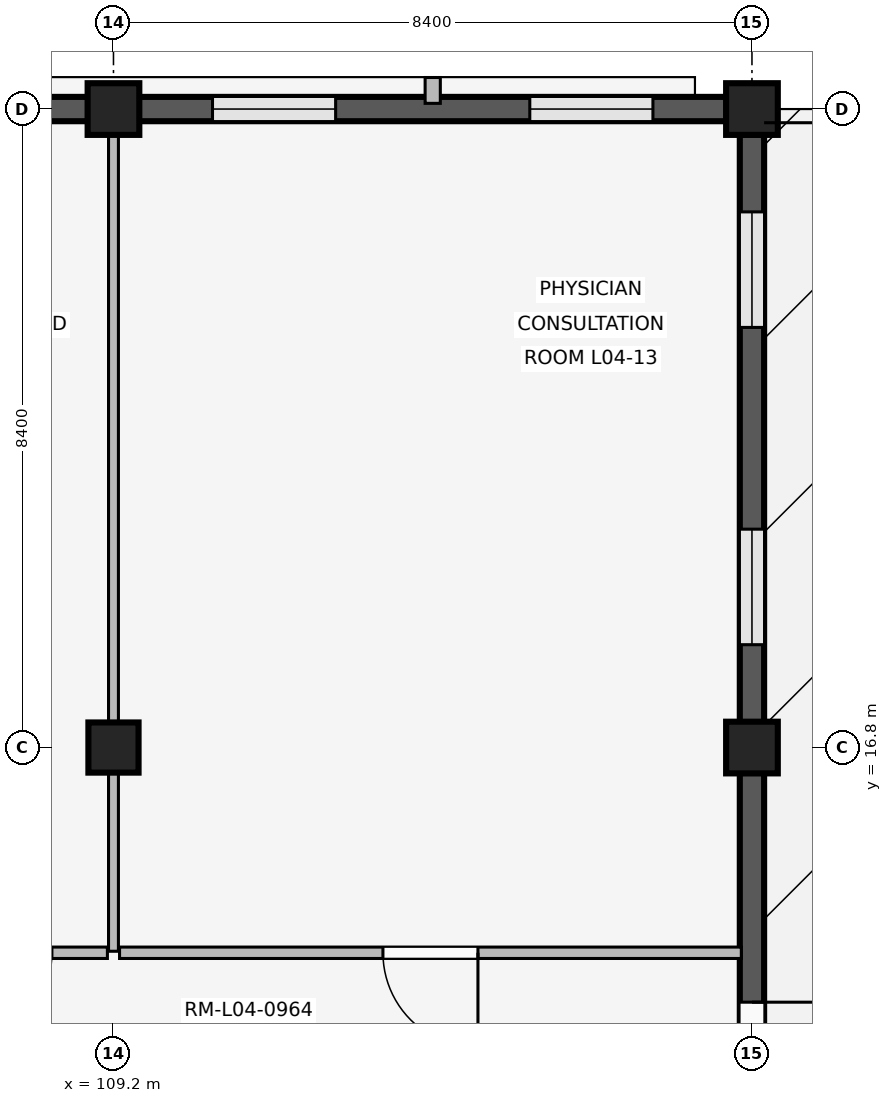
"""IFC4 building model, lengths in metres.
Left out: names, types, materials, properties, quantities, classifications, styles, units other than length and angle.
Written with IfcOpenShell. Run it as: python <this file> out.ifc"""

import sys

from ifc_helpers import new_model, si_unit, direction, frame, frame_2d, origin, origin_2d, place, context, subcontext, project, spatial, rectangle, extrude, element, fill, save


model = new_model("IFC4")
c1 = context("Model", 3, precision=1e-05, world=origin(), true_north=direction((0.0, 1.0)))
c2 = subcontext(c1, "Body", "Model", "MODEL_VIEW")
j1 = project(units=[si_unit("LENGTHUNIT", "METRE"), si_unit("PLANEANGLEUNIT", "RADIAN")], contexts=[c1])
p1 = place(None, origin())
s1 = spatial("IfcSite", under=j1, at=p1, CompositionType="ELEMENT")
p2 = place(p1, origin())
s2 = spatial("IfcBuilding", under=s1, at=p2, CompositionType="ELEMENT")
p3 = place(p2, frame((0.0, 0.0, 16.2)))
s3 = spatial("IfcBuildingStorey", under=s2, at=p3, CompositionType="ELEMENT", Elevation=16.2)
p4 = place(p3, frame((109.2, 16.8, 0.0), z_axis=(0.0, 0.0, 1.0), x_axis=(1.0, 0.0, 0.0)))
e1 = element("IfcColumn", 1, at=p4, inside=s3, PredefinedType="COLUMN", context=c2, shape_type="SweptSolid", body=[
    extrude(rectangle(XDim=0.66, YDim=0.66, at=origin_2d()), origin(), (0.0, 0.0, 1.0), 4.2),
])
for number, where, z_axis, x_axis in (
    (2, (109.2, 25.2, 0.0), (0.0, 0.0, 1.0), (1.0, 0.0, 0.0)),
    (3, (117.6, 16.8, 0.0), (0.0, 0.0, 1.0), (1.0, 0.0, 0.0)),
    (4, (117.6, 25.2, 0.0), (0.0, 0.0, 1.0), (1.0, 0.0, 0.0)),
):
    element("IfcColumn", number, at=place(p3, frame(where, z_axis=z_axis, x_axis=x_axis)), inside=s3, PredefinedType="COLUMN", context=c2, shape_type="SweptSolid", body=[
        extrude(rectangle(XDim=0.68, YDim=0.68, at=origin_2d()), origin(), (0.0, 0.0, 1.0), 4.2),
    ])
p5 = place(p3, frame((101.135, 25.2, 0.0), z_axis=(0.0, 0.0, 1.0), x_axis=(1.0, 0.0, 0.0)))
e5 = element("IfcWall", 5, at=p5, inside=s3, PredefinedType="SOLIDWALL", context=c2, shape_type="SweptSolid", body=[
    extrude(rectangle(XDim=7.73, YDim=0.32, at=frame_2d((3.865, 0.0))), origin(), (0.0, 0.0, 1.0), 3.32),
])
p6 = place(p5, frame((1.158, 0.0, 0.85)))
e6 = element("IfcOpeningElement", 6, at=p6, cuts=e5, PredefinedType="OPENING", context=c2, shape_type="SweptSolid", body=[
    extrude(rectangle(XDim=1.24, YDim=1.34, at=frame_2d((0.62, 0.67))), frame((0.0, 0.17, 0.0), z_axis=(0.0, -1.0, 0.0), x_axis=(1.0, 0.0, 0.0)), (0.0, 0.0, 1.0), 0.34),
])
p7 = place(p5, frame((5.332, 0.0, 0.85)))
e7 = element("IfcOpeningElement", 7, at=p7, cuts=e5, PredefinedType="OPENING", context=c2, shape_type="SweptSolid", body=[
    extrude(rectangle(XDim=1.24, YDim=1.34, at=frame_2d((0.62, 0.67))), frame((0.0, 0.17, 0.0), z_axis=(0.0, -1.0, 0.0), x_axis=(1.0, 0.0, 0.0)), (0.0, 0.0, 1.0), 0.34),
])
p8 = place(p3, frame((117.6, 16.465, 0.0), z_axis=(0.0, 0.0, 1.0), x_axis=(0.0, -1.0, 0.0)))
e8 = element("IfcWall", 8, at=p8, inside=s3, PredefinedType="SOLIDWALL", context=c2, shape_type="SweptSolid", body=[
    extrude(rectangle(XDim=7.73, YDim=0.32, at=frame_2d((3.865, 0.0))), origin(), (0.0, 0.0, 1.0), 3.32),
])
p9 = place(p8, frame((3.015, 0.0, 0.0)))
e9 = element("IfcOpeningElement", 9, at=p9, cuts=e8, PredefinedType="OPENING", context=c2, shape_type="SweptSolid", body=[
    extrude(rectangle(XDim=1.7, YDim=2.3, at=frame_2d((0.85, 1.15))), frame((0.0, 0.17, 0.0), z_axis=(0.0, -1.0, 0.0), x_axis=(1.0, 0.0, 0.0)), (0.0, 0.0, 1.0), 0.34),
])
p10 = place(p3, frame((109.535, 25.2, 0.0), z_axis=(0.0, 0.0, 1.0), x_axis=(1.0, 0.0, 0.0)))
e10 = element("IfcWall", 10, at=p10, inside=s3, PredefinedType="SOLIDWALL", context=c2, shape_type="SweptSolid", body=[
    extrude(rectangle(XDim=7.73, YDim=0.32, at=frame_2d((3.865, 0.0))), origin(), (0.0, 0.0, 1.0), 3.32),
])
p11 = place(p10, frame((0.968, 0.0, 0.85)))
e11 = element("IfcOpeningElement", 11, at=p11, cuts=e10, PredefinedType="OPENING", context=c2, shape_type="SweptSolid", body=[
    extrude(rectangle(XDim=1.62, YDim=1.52, at=frame_2d((0.81, 0.76))), frame((0.0, 0.17, 0.0), z_axis=(0.0, -1.0, 0.0), x_axis=(1.0, 0.0, 0.0)), (0.0, 0.0, 1.0), 0.34),
])
p12 = place(p10, frame((5.142, 0.0, 0.85)))
e12 = element("IfcOpeningElement", 12, at=p12, cuts=e10, PredefinedType="OPENING", context=c2, shape_type="SweptSolid", body=[
    extrude(rectangle(XDim=1.62, YDim=1.52, at=frame_2d((0.81, 0.76))), frame((0.0, 0.17, 0.0), z_axis=(0.0, -1.0, 0.0), x_axis=(1.0, 0.0, 0.0)), (0.0, 0.0, 1.0), 0.34),
])
p13 = place(p3, frame((113.4, 25.275, 0.0), z_axis=(0.0, 0.0, 1.0), x_axis=(0.0, 1.0, 0.0)))
e13 = element("IfcWall", 13, at=p13, inside=s3, PredefinedType="ELEMENTEDWALL", context=c2, shape_type="SweptSolid", body=[
    extrude(rectangle(XDim=0.34, YDim=0.2, at=frame_2d((0.17, 0.0))), origin(), (0.0, 0.0, 1.0), 3.3),
])
p14 = place(p3, frame((117.6, 24.865, 0.0), z_axis=(0.0, 0.0, 1.0), x_axis=(0.0, -1.0, 0.0)))
e14 = element("IfcWall", 14, at=p14, inside=s3, PredefinedType="SOLIDWALL", context=c2, shape_type="SweptSolid", body=[
    extrude(rectangle(XDim=7.73, YDim=0.32, at=frame_2d((3.865, 0.0))), origin(), (0.0, 0.0, 1.0), 3.32),
])
p15 = place(p14, frame((1.018, 0.0, 0.85)))
e15 = element("IfcOpeningElement", 15, at=p15, cuts=e14, PredefinedType="OPENING", context=c2, shape_type="SweptSolid", body=[
    extrude(rectangle(XDim=1.52, YDim=1.65, at=frame_2d((0.76, 0.825))), frame((0.0, 0.17, 0.0), z_axis=(0.0, -1.0, 0.0), x_axis=(1.0, 0.0, 0.0)), (0.0, 0.0, 1.0), 0.34),
])
p16 = place(p14, frame((5.192, 0.0, 0.85)))
e16 = element("IfcOpeningElement", 16, at=p16, cuts=e14, PredefinedType="OPENING", context=c2, shape_type="SweptSolid", body=[
    extrude(rectangle(XDim=1.52, YDim=1.65, at=frame_2d((0.76, 0.825))), frame((0.0, 0.17, 0.0), z_axis=(0.0, -1.0, 0.0), x_axis=(1.0, 0.0, 0.0)), (0.0, 0.0, 1.0), 0.34),
])
p17 = place(p3, frame((109.12, 14.1, 0.0), z_axis=(0.0, 0.0, 1.0), x_axis=(-1.0, 0.0, 0.0)))
e17 = element("IfcWall", 17, at=p17, inside=s3, PredefinedType="PARTITIONING", context=c2, shape_type="SweptSolid", body=[
    extrude(rectangle(XDim=7.96, YDim=0.15, at=frame_2d((3.98, 0.0))), origin(), (0.0, 0.0, 1.0), 3.3),
])
p18 = place(p17, frame((0.73, 0.0, 0.0)))
e18 = element("IfcOpeningElement", 18, at=p18, cuts=e17, PredefinedType="OPENING", context=c2, shape_type="SweptSolid", body=[
    extrude(rectangle(XDim=1.3, YDim=2.25, at=frame_2d((0.65, 1.125))), frame((0.0, 0.085, 0.0), z_axis=(0.0, -1.0, 0.0), x_axis=(1.0, 0.0, 0.0)), (0.0, 0.0, 1.0), 0.17),
])
p19 = place(p17, frame((4.43, 0.0, 0.0)))
e19 = element("IfcOpeningElement", 19, at=p19, cuts=e17, PredefinedType="OPENING", context=c2, shape_type="SweptSolid", body=[
    extrude(rectangle(XDim=1.3, YDim=2.25, at=frame_2d((0.65, 1.125))), frame((0.0, 0.085, 0.0), z_axis=(0.0, -1.0, 0.0), x_axis=(1.0, 0.0, 0.0)), (0.0, 0.0, 1.0), 0.17),
])
p20 = place(p3, frame((109.2, 14.12, 0.0), z_axis=(0.0, 0.0, 1.0), x_axis=(0.0, 1.0, 0.0)))
e20 = element("IfcWall", 20, at=p20, inside=s3, PredefinedType="PARTITIONING", context=c2, shape_type="SweptSolid", body=[
    extrude(rectangle(XDim=10.94, YDim=0.13, at=frame_2d((5.47, 0.0))), origin(), (0.0, 0.0, 1.0), 3.3),
])
p21 = place(p3, frame((117.46, 14.1, 0.0), z_axis=(0.0, 0.0, 1.0), x_axis=(-1.0, 0.0, 0.0)))
e21 = element("IfcWall", 21, at=p21, inside=s3, PredefinedType="PARTITIONING", context=c2, shape_type="SweptSolid", body=[
    extrude(rectangle(XDim=8.18, YDim=0.15, at=frame_2d((4.09, 0.0))), origin(), (0.0, 0.0, 1.0), 3.3),
])
p22 = place(p21, frame((3.465, 0.0, 0.0)))
e22 = element("IfcOpeningElement", 22, at=p22, cuts=e21, PredefinedType="OPENING", context=c2, shape_type="SweptSolid", body=[
    extrude(rectangle(XDim=1.25, YDim=2.2, at=frame_2d((0.625, 1.1))), frame((0.0, 0.085, 0.0), z_axis=(0.0, -1.0, 0.0), x_axis=(1.0, 0.0, 0.0)), (0.0, 0.0, 1.0), 0.17),
])
p23 = place(p9, origin())
e23 = element("IfcDoor", 23, at=p23, inside=s3, OperationType="DOUBLE_SWING_LEFT", PredefinedType="DOOR", context=c2, shape_type="SweptSolid", body=[
    extrude(rectangle(XDim=1.7, YDim=2.3, at=frame_2d((0.85, 1.15))), frame((0.0, 0.025, 0.0), z_axis=(0.0, -1.0, 0.0), x_axis=(1.0, 0.0, 0.0)), (0.0, 0.0, 1.0), 0.05),
])
fill(e9, e23)
p24 = place(p11, origin())
e24 = element("IfcWindow", 24, at=p24, inside=s3, PartitioningType="SINGLE_PANEL", PredefinedType="WINDOW", context=c2, shape_type="SweptSolid", body=[
    extrude(rectangle(XDim=1.62, YDim=1.52, at=frame_2d((0.81, 0.76))), frame((0.0, 0.03, 0.0), z_axis=(0.0, -1.0, 0.0), x_axis=(1.0, 0.0, 0.0)), (0.0, 0.0, 1.0), 0.06),
])
fill(e11, e24)
p25 = place(p12, origin())
e25 = element("IfcWindow", 25, at=p25, inside=s3, PartitioningType="SINGLE_PANEL", PredefinedType="WINDOW", context=c2, shape_type="SweptSolid", body=[
    extrude(rectangle(XDim=1.62, YDim=1.52, at=frame_2d((0.81, 0.76))), frame((0.0, 0.03, 0.0), z_axis=(0.0, -1.0, 0.0), x_axis=(1.0, 0.0, 0.0)), (0.0, 0.0, 1.0), 0.06),
])
fill(e12, e25)
p26 = place(p15, origin())
e26 = element("IfcWindow", 26, at=p26, inside=s3, PartitioningType="SINGLE_PANEL", PredefinedType="WINDOW", context=c2, shape_type="SweptSolid", body=[
    extrude(rectangle(XDim=1.52, YDim=1.65, at=frame_2d((0.76, 0.825))), frame((0.0, 0.03, 0.0), z_axis=(0.0, -1.0, 0.0), x_axis=(1.0, 0.0, 0.0)), (0.0, 0.0, 1.0), 0.06),
])
fill(e15, e26)
p27 = place(p16, origin())
e27 = element("IfcWindow", 27, at=p27, inside=s3, PartitioningType="SINGLE_PANEL", PredefinedType="WINDOW", context=c2, shape_type="SweptSolid", body=[
    extrude(rectangle(XDim=1.52, YDim=1.65, at=frame_2d((0.76, 0.825))), frame((0.0, 0.03, 0.0), z_axis=(0.0, -1.0, 0.0), x_axis=(1.0, 0.0, 0.0)), (0.0, 0.0, 1.0), 0.06),
])
fill(e16, e27)
p28 = place(p22, origin())
e28 = element("IfcDoor", 28, at=p28, inside=s3, OperationType="SINGLE_SWING_LEFT", PredefinedType="DOOR", context=c2, shape_type="SweptSolid", body=[
    extrude(rectangle(XDim=1.25, YDim=2.2, at=frame_2d((0.625, 1.1))), frame((0.0, 0.025, 0.0), z_axis=(0.0, -1.0, 0.0), x_axis=(1.0, 0.0, 0.0)), (0.0, 0.0, 1.0), 0.05),
])
fill(e22, e28)
save(model, sys.argv[1])
